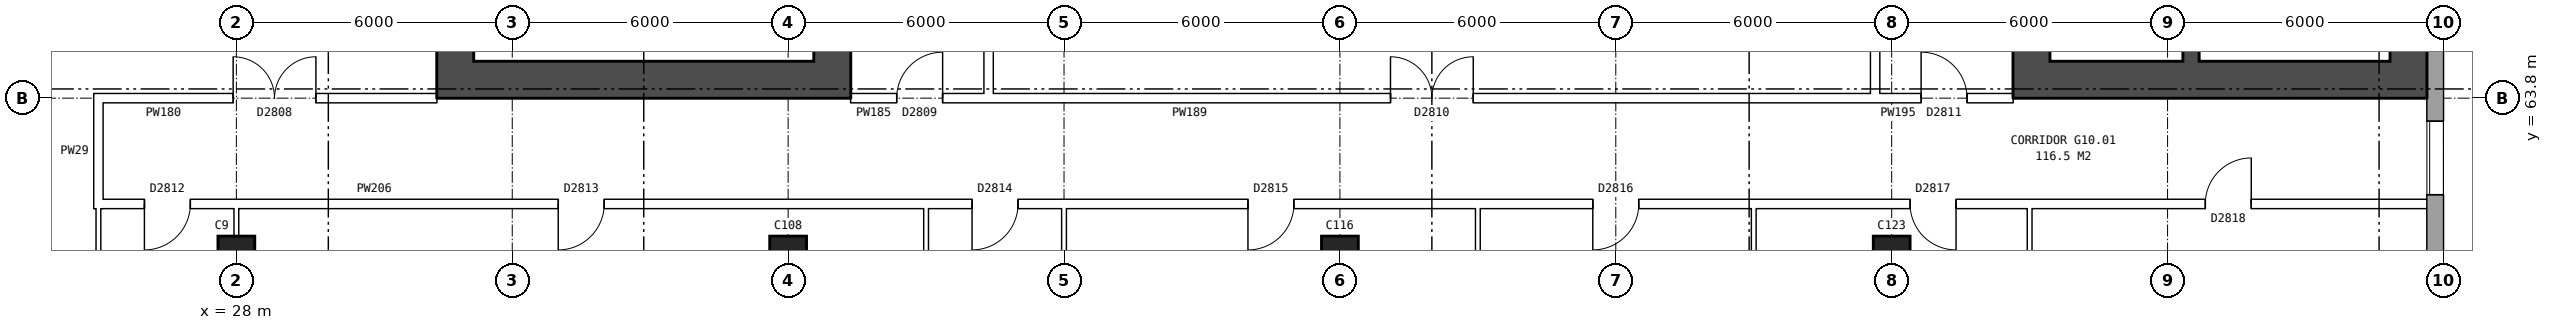
"""IFC4 building model, lengths in metres.
Left out: names, types, materials, properties, quantities, classifications, styles, units other than length and angle.
Written with IfcOpenShell. Run it as: python <this file> out.ifc"""

import sys

from ifc_helpers import new_model, si_unit, direction, frame, frame_2d, origin, origin_2d, place, context, subcontext, project, spatial, rectangle, extrude, element, fill, save


model = new_model("IFC4")
c1 = context("Model", 3, precision=1e-05, world=origin(), true_north=direction((0.0, 1.0)))
c2 = subcontext(c1, "Body", "Model", "MODEL_VIEW")
j1 = project(units=[si_unit("LENGTHUNIT", "METRE"), si_unit("PLANEANGLEUNIT", "RADIAN")], contexts=[c1])
p1 = place(None, origin())
s1 = spatial("IfcSite", under=j1, at=p1, CompositionType="ELEMENT")
p2 = place(p1, origin())
s2 = spatial("IfcBuilding", under=s1, at=p2, CompositionType="ELEMENT")
p3 = place(p2, frame((0.0, 0.0, 38.1)))
s3 = spatial("IfcBuildingStorey", under=s2, at=p3, CompositionType="ELEMENT", Elevation=38.1)
for number, where, z_axis, x_axis in (
    (1, (28.0, 60.4, 0.0), (0.0, 0.0, 1.0), (1.0, 0.0, 0.0)),
    (2, (40.0, 60.4, 0.0), (0.0, 0.0, 1.0), (1.0, 0.0, 0.0)),
    (3, (52.0, 60.4, 0.0), (0.0, 0.0, 1.0), (1.0, 0.0, 0.0)),
    (4, (64.0, 60.4, 0.0), (0.0, 0.0, 1.0), (1.0, 0.0, 0.0)),
):
    element("IfcColumn", number, at=place(p3, frame(where, z_axis=z_axis, x_axis=x_axis)), inside=s3, PredefinedType="COLUMN", context=c2, shape_type="SweptSolid", body=[
        extrude(rectangle(XDim=0.8, YDim=0.8, at=origin_2d()), origin(), (0.0, 0.0, 1.0), 5.6),
    ])
p4 = place(p3, frame((75.82, 57.075, 0.0), z_axis=(0.0, 0.0, 1.0), x_axis=(0.0, 1.0, 0.0)))
e5 = element("IfcWall", 5, at=p4, inside=s3, PredefinedType="STANDARD", context=c2, shape_type="SweptSolid", body=[
    extrude(rectangle(XDim=25.851, YDim=0.36, at=frame_2d((12.925, 0.0))), origin(), (0.0, 0.0, 1.0), 5.6),
])
p5 = place(p4, frame((1.625, 0.0, 0.15)))
e6 = element("IfcOpeningElement", 6, at=p5, cuts=e5, PredefinedType="OPENING", context=c2, shape_type="SweptSolid", body=[
    extrude(rectangle(XDim=1.6, YDim=2.4, at=frame_2d((0.8, 1.2))), frame((0.0, 0.19, 0.0), z_axis=(0.0, -1.0, 0.0), x_axis=(1.0, 0.0, 0.0)), (0.0, 0.0, 1.0), 0.38),
])
p6 = place(p4, frame((4.625, 0.0, 0.15)))
e7 = element("IfcOpeningElement", 7, at=p6, cuts=e5, PredefinedType="OPENING", context=c2, shape_type="SweptSolid", body=[
    extrude(rectangle(XDim=1.6, YDim=2.4, at=frame_2d((0.8, 1.2))), frame((0.0, 0.19, 0.0), z_axis=(0.0, -1.0, 0.0), x_axis=(1.0, 0.0, 0.0)), (0.0, 0.0, 1.0), 0.38),
])
p7 = place(p4, frame((19.625, 0.0, 0.15)))
e8 = element("IfcOpeningElement", 8, at=p7, cuts=e5, PredefinedType="OPENING", context=c2, shape_type="SweptSolid", body=[
    extrude(rectangle(XDim=1.6, YDim=2.4, at=frame_2d((0.8, 1.2))), frame((0.0, 0.19, 0.0), z_axis=(0.0, -1.0, 0.0), x_axis=(1.0, 0.0, 0.0)), (0.0, 0.0, 1.0), 0.38),
])
p8 = place(p4, frame((22.625, 0.0, 0.15)))
e9 = element("IfcOpeningElement", 9, at=p8, cuts=e5, PredefinedType="OPENING", context=c2, shape_type="SweptSolid", body=[
    extrude(rectangle(XDim=1.6, YDim=2.4, at=frame_2d((0.8, 1.2))), frame((0.0, 0.19, 0.0), z_axis=(0.0, -1.0, 0.0), x_axis=(1.0, 0.0, 0.0)), (0.0, 0.0, 1.0), 0.38),
])
p9 = place(p3, frame((67.04, 64.6, 0.0), z_axis=(0.0, 0.0, 1.0), x_axis=(0.0, 1.0, 0.0)))
e10 = element("IfcWall", 10, at=p9, inside=s3, PredefinedType="SHEAR", context=c2, shape_type="SweptSolid", body=[
    extrude(rectangle(XDim=10.8, YDim=0.8, at=frame_2d((5.4, 0.0))), origin(), (0.0, 0.0, 1.0), 5.6),
])
p10 = place(p9, frame((0.525, 0.0, 0.0)))
e11 = element("IfcOpeningElement", 11, at=p10, cuts=e10, PredefinedType="OPENING", context=c2, shape_type="SweptSolid", body=[
    extrude(rectangle(XDim=1.1, YDim=2.1, at=frame_2d((0.55, 1.05))), frame((0.0, 0.41, 0.0), z_axis=(0.0, -1.0, 0.0), x_axis=(1.0, 0.0, 0.0)), (0.0, 0.0, 1.0), 0.82),
])
p11 = place(p9, frame((9.1, 0.0, 0.0)))
e12 = element("IfcOpeningElement", 12, at=p11, cuts=e10, PredefinedType="OPENING", context=c2, shape_type="SweptSolid", body=[
    extrude(rectangle(XDim=1.1, YDim=2.1, at=frame_2d((0.55, 1.05))), frame((0.0, 0.41, 0.0), z_axis=(0.0, -1.0, 0.0), x_axis=(1.0, 0.0, 0.0)), (0.0, 0.0, 1.0), 0.82),
])
p12 = place(p3, frame((75.24, 64.6, 0.0), z_axis=(0.0, 0.0, 1.0), x_axis=(0.0, 1.0, 0.0)))
e13 = element("IfcWall", 13, at=p12, inside=s3, PredefinedType="SHEAR", context=c2, shape_type="SweptSolid", body=[
    extrude(rectangle(XDim=10.8, YDim=0.8, at=frame_2d((5.4, 0.0))), origin(), (0.0, 0.0, 1.0), 5.6),
])
p13 = place(p3, frame((66.64, 64.2, 0.0), z_axis=(0.0, 0.0, 1.0), x_axis=(1.0, 0.0, 0.0)))
e14 = element("IfcWall", 14, at=p13, inside=s3, PredefinedType="SHEAR", context=c2, shape_type="SweptSolid", body=[
    extrude(rectangle(XDim=9.0, YDim=0.8, at=frame_2d((4.5, 0.0))), origin(), (0.0, 0.0, 1.0), 5.6),
])
p14 = place(p3, frame((70.51, 64.6, 0.0), z_axis=(0.0, 0.0, 1.0), x_axis=(0.0, 1.0, 0.0)))
e15 = element("IfcWall", 15, at=p14, inside=s3, PredefinedType="SHEAR", context=c2, shape_type="SweptSolid", body=[
    extrude(rectangle(XDim=2.075, YDim=0.35, at=frame_2d((1.038, 0.0))), origin(), (0.0, 0.0, 1.0), 5.6),
])
p15 = place(p3, frame((63.64, 63.9, 0.0), z_axis=(0.0, 0.0, 1.0), x_axis=(0.0, 1.0, 0.0)))
e16 = element("IfcWall", 16, at=p15, inside=s3, PredefinedType="PARTITIONING", context=c2, shape_type="SweptSolid", body=[
    extrude(rectangle(XDim=12.2, YDim=0.2, at=frame_2d((6.1, 0.0))), origin(), (0.0, 0.0, 1.0), 5.6),
])
p16 = place(p15, frame((5.1, 0.0, 0.0)))
e17 = element("IfcOpeningElement", 17, at=p16, cuts=e16, PredefinedType="OPENING", context=c2, shape_type="SweptSolid", body=[
    extrude(rectangle(XDim=2.0, YDim=2.1, at=frame_2d((1.0, 1.05))), frame((0.0, 0.11, 0.0), z_axis=(0.0, -1.0, 0.0), x_axis=(1.0, 0.0, 0.0)), (0.0, 0.0, 1.0), 0.22),
])
p17 = place(p3, frame((40.96, 75.4, 0.0), z_axis=(0.0, 0.0, 1.0), x_axis=(0.0, -1.0, 0.0)))
e18 = element("IfcWall", 18, at=p17, inside=s3, PredefinedType="SHEAR", context=c2, shape_type="SweptSolid", body=[
    extrude(rectangle(XDim=10.8, YDim=0.8, at=frame_2d((5.4, 0.0))), origin(), (0.0, 0.0, 1.0), 5.6),
])
p18 = place(p17, frame((0.525, 0.0, 0.0)))
e19 = element("IfcOpeningElement", 19, at=p18, cuts=e18, PredefinedType="OPENING", context=c2, shape_type="SweptSolid", body=[
    extrude(rectangle(XDim=1.1, YDim=2.1, at=frame_2d((0.55, 1.05))), frame((0.0, 0.41, 0.0), z_axis=(0.0, -1.0, 0.0), x_axis=(1.0, 0.0, 0.0)), (0.0, 0.0, 1.0), 0.82),
])
p19 = place(p17, frame((2.8, 0.0, 0.0)))
e20 = element("IfcOpeningElement", 20, at=p19, cuts=e18, PredefinedType="OPENING", context=c2, shape_type="SweptSolid", body=[
    extrude(rectangle(XDim=1.1, YDim=2.1, at=frame_2d((0.55, 1.05))), frame((0.0, 0.41, 0.0), z_axis=(0.0, -1.0, 0.0), x_axis=(1.0, 0.0, 0.0)), (0.0, 0.0, 1.0), 0.82),
])
p20 = place(p17, frame((5.0, 0.0, 0.0)))
e21 = element("IfcOpeningElement", 21, at=p20, cuts=e18, PredefinedType="OPENING", context=c2, shape_type="SweptSolid", body=[
    extrude(rectangle(XDim=1.1, YDim=2.1, at=frame_2d((0.55, 1.05))), frame((0.0, 0.41, 0.0), z_axis=(0.0, -1.0, 0.0), x_axis=(1.0, 0.0, 0.0)), (0.0, 0.0, 1.0), 0.82),
])
p21 = place(p17, frame((7.2, 0.0, 0.0)))
e22 = element("IfcOpeningElement", 22, at=p21, cuts=e18, PredefinedType="OPENING", context=c2, shape_type="SweptSolid", body=[
    extrude(rectangle(XDim=1.1, YDim=2.1, at=frame_2d((0.55, 1.05))), frame((0.0, 0.41, 0.0), z_axis=(0.0, -1.0, 0.0), x_axis=(1.0, 0.0, 0.0)), (0.0, 0.0, 1.0), 0.82),
])
p22 = place(p17, frame((9.1, 0.0, 0.0)))
e23 = element("IfcOpeningElement", 23, at=p22, cuts=e18, PredefinedType="OPENING", context=c2, shape_type="SweptSolid", body=[
    extrude(rectangle(XDim=1.1, YDim=2.1, at=frame_2d((0.55, 1.05))), frame((0.0, 0.41, 0.0), z_axis=(0.0, -1.0, 0.0), x_axis=(1.0, 0.0, 0.0)), (0.0, 0.0, 1.0), 0.82),
])
p23 = place(p3, frame((32.76, 75.4, 0.0), z_axis=(0.0, 0.0, 1.0), x_axis=(0.0, -1.0, 0.0)))
e24 = element("IfcWall", 24, at=p23, inside=s3, PredefinedType="SHEAR", context=c2, shape_type="SweptSolid", body=[
    extrude(rectangle(XDim=10.8, YDim=0.8, at=frame_2d((5.4, 0.0))), origin(), (0.0, 0.0, 1.0), 5.6),
])
p24 = place(p3, frame((41.36, 64.2, 0.0), z_axis=(0.0, 0.0, 1.0), x_axis=(-1.0, 0.0, 0.0)))
e25 = element("IfcWall", 25, at=p24, inside=s3, PredefinedType="SHEAR", context=c2, shape_type="SweptSolid", body=[
    extrude(rectangle(XDim=9.0, YDim=0.8, at=frame_2d((4.5, 0.0))), origin(), (0.0, 0.0, 1.0), 5.6),
])
p25 = place(p3, frame((44.36, 63.9, 0.0), z_axis=(0.0, 0.0, 1.0), x_axis=(0.0, 1.0, 0.0)))
e26 = element("IfcWall", 26, at=p25, inside=s3, PredefinedType="PARTITIONING", context=c2, shape_type="SweptSolid", body=[
    extrude(rectangle(XDim=12.2, YDim=0.2, at=frame_2d((6.1, 0.0))), origin(), (0.0, 0.0, 1.0), 5.6),
])
p26 = place(p25, frame((5.1, 0.0, 0.0)))
e27 = element("IfcOpeningElement", 27, at=p26, cuts=e26, PredefinedType="OPENING", context=c2, shape_type="SweptSolid", body=[
    extrude(rectangle(XDim=2.0, YDim=2.1, at=frame_2d((1.0, 1.05))), frame((0.0, 0.11, 0.0), z_axis=(0.0, -1.0, 0.0), x_axis=(1.0, 0.0, 0.0)), (0.0, 0.0, 1.0), 0.22),
])
p27 = place(p3, frame((24.9, 61.5, 0.0), z_axis=(0.0, 0.0, 1.0), x_axis=(1.0, 0.0, 0.0)))
e28 = element("IfcWall", 28, at=p27, inside=s3, PredefinedType="PARTITIONING", context=c2, shape_type="SweptSolid", body=[
    extrude(rectangle(XDim=50.86, YDim=0.2, at=frame_2d((25.43, 0.0))), origin(), (0.0, 0.0, 1.0), 5.6),
])
p28 = place(p27, frame((1.1, 0.0, 0.0)))
e29 = element("IfcOpeningElement", 29, at=p28, cuts=e28, PredefinedType="OPENING", context=c2, shape_type="SweptSolid", body=[
    extrude(rectangle(XDim=1.0, YDim=2.1, at=frame_2d((0.5, 1.05))), frame((0.0, 0.11, 0.0), z_axis=(0.0, -1.0, 0.0), x_axis=(1.0, 0.0, 0.0)), (0.0, 0.0, 1.0), 0.22),
])
p29 = place(p27, frame((10.1, 0.0, 0.0)))
e30 = element("IfcOpeningElement", 30, at=p29, cuts=e28, PredefinedType="OPENING", context=c2, shape_type="SweptSolid", body=[
    extrude(rectangle(XDim=1.0, YDim=2.1, at=frame_2d((0.5, 1.05))), frame((0.0, 0.11, 0.0), z_axis=(0.0, -1.0, 0.0), x_axis=(1.0, 0.0, 0.0)), (0.0, 0.0, 1.0), 0.22),
])
p30 = place(p27, frame((19.1, 0.0, 0.0)))
e31 = element("IfcOpeningElement", 31, at=p30, cuts=e28, PredefinedType="OPENING", context=c2, shape_type="SweptSolid", body=[
    extrude(rectangle(XDim=1.0, YDim=2.1, at=frame_2d((0.5, 1.05))), frame((0.0, 0.11, 0.0), z_axis=(0.0, -1.0, 0.0), x_axis=(1.0, 0.0, 0.0)), (0.0, 0.0, 1.0), 0.22),
])
p31 = place(p27, frame((25.1, 0.0, 0.0)))
e32 = element("IfcOpeningElement", 32, at=p31, cuts=e28, PredefinedType="OPENING", context=c2, shape_type="SweptSolid", body=[
    extrude(rectangle(XDim=1.0, YDim=2.1, at=frame_2d((0.5, 1.05))), frame((0.0, 0.11, 0.0), z_axis=(0.0, -1.0, 0.0), x_axis=(1.0, 0.0, 0.0)), (0.0, 0.0, 1.0), 0.22),
])
p32 = place(p27, frame((32.6, 0.0, 0.0)))
e33 = element("IfcOpeningElement", 33, at=p32, cuts=e28, PredefinedType="OPENING", context=c2, shape_type="SweptSolid", body=[
    extrude(rectangle(XDim=1.0, YDim=2.1, at=frame_2d((0.5, 1.05))), frame((0.0, 0.11, 0.0), z_axis=(0.0, -1.0, 0.0), x_axis=(1.0, 0.0, 0.0)), (0.0, 0.0, 1.0), 0.22),
])
p33 = place(p27, frame((39.5, 0.0, 0.0)))
e34 = element("IfcOpeningElement", 34, at=p33, cuts=e28, PredefinedType="OPENING", context=c2, shape_type="SweptSolid", body=[
    extrude(rectangle(XDim=1.0, YDim=2.1, at=frame_2d((0.5, 1.05))), frame((0.0, 0.11, 0.0), z_axis=(0.0, -1.0, 0.0), x_axis=(1.0, 0.0, 0.0)), (0.0, 0.0, 1.0), 0.22),
])
p34 = place(p27, frame((45.92, 0.0, 0.0)))
e35 = element("IfcOpeningElement", 35, at=p34, cuts=e28, PredefinedType="OPENING", context=c2, shape_type="SweptSolid", body=[
    extrude(rectangle(XDim=1.0, YDim=2.1, at=frame_2d((0.5, 1.05))), frame((0.0, 0.11, 0.0), z_axis=(0.0, -1.0, 0.0), x_axis=(1.0, 0.0, 0.0)), (0.0, 0.0, 1.0), 0.22),
])
p35 = place(p3, frame((24.9, 63.8, 0.0), z_axis=(0.0, 0.0, 1.0), x_axis=(1.0, 0.0, 0.0)))
e36 = element("IfcWall", 36, at=p35, inside=s3, PredefinedType="PARTITIONING", context=c2, shape_type="SweptSolid", body=[
    extrude(rectangle(XDim=7.46, YDim=0.2, at=frame_2d((3.73, 0.0))), origin(), (0.0, 0.0, 1.0), 5.6),
])
p36 = place(p35, frame((3.03, 0.0, 0.0)))
e37 = element("IfcOpeningElement", 37, at=p36, cuts=e36, PredefinedType="OPENING", context=c2, shape_type="SweptSolid", body=[
    extrude(rectangle(XDim=1.8, YDim=2.1, at=frame_2d((0.9, 1.05))), frame((0.0, 0.11, 0.0), z_axis=(0.0, -1.0, 0.0), x_axis=(1.0, 0.0, 0.0)), (0.0, 0.0, 1.0), 0.22),
])
p37 = place(p3, frame((44.36, 63.8, 0.0), z_axis=(0.0, 0.0, 1.0), x_axis=(1.0, 0.0, 0.0)))
e38 = element("IfcWall", 38, at=p37, inside=s3, PredefinedType="PARTITIONING", context=c2, shape_type="SweptSolid", body=[
    extrude(rectangle(XDim=19.28, YDim=0.2, at=frame_2d((9.64, 0.0))), origin(), (0.0, 0.0, 1.0), 5.6),
])
p38 = place(p37, frame((8.74, 0.0, 0.0)))
e39 = element("IfcOpeningElement", 39, at=p38, cuts=e38, PredefinedType="OPENING", context=c2, shape_type="SweptSolid", body=[
    extrude(rectangle(XDim=1.8, YDim=2.1, at=frame_2d((0.9, 1.05))), frame((0.0, 0.11, 0.0), z_axis=(0.0, -1.0, 0.0), x_axis=(1.0, 0.0, 0.0)), (0.0, 0.0, 1.0), 0.22),
])
p39 = place(p3, frame((41.36, 63.8, 0.0), z_axis=(0.0, 0.0, 1.0), x_axis=(1.0, 0.0, 0.0)))
e40 = element("IfcWall", 40, at=p39, inside=s3, PredefinedType="PARTITIONING", context=c2, shape_type="SweptSolid", body=[
    extrude(rectangle(XDim=3.0, YDim=0.2, at=frame_2d((1.5, 0.0))), origin(), (0.0, 0.0, 1.0), 5.6),
])
p40 = place(p39, frame((1.0, 0.0, 0.0)))
e41 = element("IfcOpeningElement", 41, at=p40, cuts=e40, PredefinedType="OPENING", context=c2, shape_type="SweptSolid", body=[
    extrude(rectangle(XDim=1.0, YDim=2.1, at=frame_2d((0.5, 1.05))), frame((0.0, 0.11, 0.0), z_axis=(0.0, -1.0, 0.0), x_axis=(1.0, 0.0, 0.0)), (0.0, 0.0, 1.0), 0.22),
])
p41 = place(p3, frame((63.64, 63.8, 0.0), z_axis=(0.0, 0.0, 1.0), x_axis=(1.0, 0.0, 0.0)))
e42 = element("IfcWall", 42, at=p41, inside=s3, PredefinedType="PARTITIONING", context=c2, shape_type="SweptSolid", body=[
    extrude(rectangle(XDim=3.0, YDim=0.2, at=frame_2d((1.5, 0.0))), origin(), (0.0, 0.0, 1.0), 5.6),
])
p42 = place(p41, frame((1.0, 0.0, 0.0)))
e43 = element("IfcOpeningElement", 43, at=p42, cuts=e42, PredefinedType="OPENING", context=c2, shape_type="SweptSolid", body=[
    extrude(rectangle(XDim=1.0, YDim=2.1, at=frame_2d((0.5, 1.05))), frame((0.0, 0.11, 0.0), z_axis=(0.0, -1.0, 0.0), x_axis=(1.0, 0.0, 0.0)), (0.0, 0.0, 1.0), 0.22),
])
p43 = place(p3, frame((25.0, 61.398, 0.0), z_axis=(0.0, 0.0, 1.0), x_axis=(0.0, 1.0, 0.0)))
e44 = element("IfcWall", 44, at=p43, inside=s3, PredefinedType="PARTITIONING", context=c2, shape_type="SweptSolid", body=[
    extrude(rectangle(XDim=2.502, YDim=0.2, at=frame_2d((1.251, 0.0))), origin(), (0.0, 0.0, 1.0), 5.6),
])
for number, where, z_axis, x_axis in (
    (45, (25.0, 54.24, 0.0), (0.0, 0.0, 1.0), (0.0, 1.0, 0.0)),
    (46, (28.0, 54.24, 0.0), (0.0, 0.0, 1.0), (0.0, 1.0, 0.0)),
    (47, (43.0, 54.24, 0.0), (0.0, 0.0, 1.0), (0.0, 1.0, 0.0)),
    (48, (46.0, 54.24, 0.0), (0.0, 0.0, 1.0), (0.0, 1.0, 0.0)),
    (49, (55.0, 54.24, 0.0), (0.0, 0.0, 1.0), (0.0, 1.0, 0.0)),
    (50, (61.0, 54.24, 0.0), (0.0, 0.0, 1.0), (0.0, 1.0, 0.0)),
    (51, (67.0, 54.24, 0.0), (0.0, 0.0, 1.0), (0.0, 1.0, 0.0)),
):
    element("IfcWall", number, at=place(p3, frame(where, z_axis=z_axis, x_axis=x_axis)), inside=s3, PredefinedType="PARTITIONING", context=c2, shape_type="SweptSolid", body=[
        extrude(rectangle(XDim=7.36, YDim=0.1, at=frame_2d((3.68, 0.0))), origin(), (0.0, 0.0, 1.0), 5.6),
    ])
p44 = place(p6, origin())
e52 = element("IfcWindow", 52, at=p44, inside=s3, PartitioningType="SINGLE_PANEL", PredefinedType="WINDOW", context=c2, shape_type="SweptSolid", body=[
    extrude(rectangle(XDim=1.6, YDim=2.4, at=frame_2d((0.8, 1.2))), frame((0.0, 0.15, 0.0), z_axis=(0.0, -1.0, 0.0), x_axis=(1.0, 0.0, 0.0)), (0.0, 0.0, 1.0), 0.06),
])
fill(e7, e52)
p45 = place(p28, frame((1.0, 0.0, 0.0), z_axis=(0.0, 0.0, 1.0), x_axis=(-1.0, 0.0, 0.0)))
e53 = element("IfcDoor", 53, at=p45, inside=s3, OperationType="SINGLE_SWING_RIGHT", PredefinedType="DOOR", context=c2, shape_type="SweptSolid", body=[
    extrude(rectangle(XDim=1.0, YDim=2.1, at=frame_2d((0.5, 1.05))), frame((0.0, 0.025, 0.0), z_axis=(0.0, -1.0, 0.0), x_axis=(1.0, 0.0, 0.0)), (0.0, 0.0, 1.0), 0.05),
])
fill(e29, e53)
p46 = place(p29, frame((1.0, 0.0, 0.0), z_axis=(0.0, 0.0, 1.0), x_axis=(-1.0, 0.0, 0.0)))
e54 = element("IfcDoor", 54, at=p46, inside=s3, OperationType="SINGLE_SWING_RIGHT", PredefinedType="DOOR", context=c2, shape_type="SweptSolid", body=[
    extrude(rectangle(XDim=1.0, YDim=2.1, at=frame_2d((0.5, 1.05))), frame((0.0, 0.025, 0.0), z_axis=(0.0, -1.0, 0.0), x_axis=(1.0, 0.0, 0.0)), (0.0, 0.0, 1.0), 0.05),
])
fill(e30, e54)
p47 = place(p30, frame((1.0, 0.0, 0.0), z_axis=(0.0, 0.0, 1.0), x_axis=(-1.0, 0.0, 0.0)))
e55 = element("IfcDoor", 55, at=p47, inside=s3, OperationType="SINGLE_SWING_RIGHT", PredefinedType="DOOR", context=c2, shape_type="SweptSolid", body=[
    extrude(rectangle(XDim=1.0, YDim=2.1, at=frame_2d((0.5, 1.05))), frame((0.0, 0.025, 0.0), z_axis=(0.0, -1.0, 0.0), x_axis=(1.0, 0.0, 0.0)), (0.0, 0.0, 1.0), 0.05),
])
fill(e31, e55)
p48 = place(p31, frame((1.0, 0.0, 0.0), z_axis=(0.0, 0.0, 1.0), x_axis=(-1.0, 0.0, 0.0)))
e56 = element("IfcDoor", 56, at=p48, inside=s3, OperationType="SINGLE_SWING_RIGHT", PredefinedType="DOOR", context=c2, shape_type="SweptSolid", body=[
    extrude(rectangle(XDim=1.0, YDim=2.1, at=frame_2d((0.5, 1.05))), frame((0.0, 0.025, 0.0), z_axis=(0.0, -1.0, 0.0), x_axis=(1.0, 0.0, 0.0)), (0.0, 0.0, 1.0), 0.05),
])
fill(e32, e56)
p49 = place(p32, frame((1.0, 0.0, 0.0), z_axis=(0.0, 0.0, 1.0), x_axis=(-1.0, 0.0, 0.0)))
e57 = element("IfcDoor", 57, at=p49, inside=s3, OperationType="SINGLE_SWING_RIGHT", PredefinedType="DOOR", context=c2, shape_type="SweptSolid", body=[
    extrude(rectangle(XDim=1.0, YDim=2.1, at=frame_2d((0.5, 1.05))), frame((0.0, 0.025, 0.0), z_axis=(0.0, -1.0, 0.0), x_axis=(1.0, 0.0, 0.0)), (0.0, 0.0, 1.0), 0.05),
])
fill(e33, e57)
p50 = place(p33, frame((1.0, 0.0, 0.0), z_axis=(0.0, 0.0, 1.0), x_axis=(-1.0, 0.0, 0.0)))
e58 = element("IfcDoor", 58, at=p50, inside=s3, OperationType="SINGLE_SWING_LEFT", PredefinedType="DOOR", context=c2, shape_type="SweptSolid", body=[
    extrude(rectangle(XDim=1.0, YDim=2.1, at=frame_2d((0.5, 1.05))), frame((0.0, 0.025, 0.0), z_axis=(0.0, -1.0, 0.0), x_axis=(1.0, 0.0, 0.0)), (0.0, 0.0, 1.0), 0.05),
])
fill(e34, e58)
p51 = place(p34, origin())
e59 = element("IfcDoor", 59, at=p51, inside=s3, OperationType="SINGLE_SWING_RIGHT", PredefinedType="DOOR", context=c2, shape_type="SweptSolid", body=[
    extrude(rectangle(XDim=1.0, YDim=2.1, at=frame_2d((0.5, 1.05))), frame((0.0, 0.025, 0.0), z_axis=(0.0, -1.0, 0.0), x_axis=(1.0, 0.0, 0.0)), (0.0, 0.0, 1.0), 0.05),
])
fill(e35, e59)
p52 = place(p36, origin())
e60 = element("IfcDoor", 60, at=p52, inside=s3, OperationType="DOUBLE_DOOR_SINGLE_SWING", PredefinedType="DOOR", context=c2, shape_type="SweptSolid", body=[
    extrude(rectangle(XDim=1.8, YDim=2.1, at=frame_2d((0.9, 1.05))), frame((0.0, 0.025, 0.0), z_axis=(0.0, -1.0, 0.0), x_axis=(1.0, 0.0, 0.0)), (0.0, 0.0, 1.0), 0.05),
])
fill(e37, e60)
p53 = place(p38, origin())
e61 = element("IfcDoor", 61, at=p53, inside=s3, OperationType="DOUBLE_DOOR_SINGLE_SWING", PredefinedType="DOOR", context=c2, shape_type="SweptSolid", body=[
    extrude(rectangle(XDim=1.8, YDim=2.1, at=frame_2d((0.9, 1.05))), frame((0.0, 0.025, 0.0), z_axis=(0.0, -1.0, 0.0), x_axis=(1.0, 0.0, 0.0)), (0.0, 0.0, 1.0), 0.05),
])
fill(e39, e61)
p54 = place(p40, origin())
e62 = element("IfcDoor", 62, at=p54, inside=s3, OperationType="SINGLE_SWING_RIGHT", PredefinedType="DOOR", context=c2, shape_type="SweptSolid", body=[
    extrude(rectangle(XDim=1.0, YDim=2.1, at=frame_2d((0.5, 1.05))), frame((0.0, 0.025, 0.0), z_axis=(0.0, -1.0, 0.0), x_axis=(1.0, 0.0, 0.0)), (0.0, 0.0, 1.0), 0.05),
])
fill(e41, e62)
p55 = place(p42, origin())
e63 = element("IfcDoor", 63, at=p55, inside=s3, OperationType="SINGLE_SWING_LEFT", PredefinedType="DOOR", context=c2, shape_type="SweptSolid", body=[
    extrude(rectangle(XDim=1.0, YDim=2.1, at=frame_2d((0.5, 1.05))), frame((0.0, 0.025, 0.0), z_axis=(0.0, -1.0, 0.0), x_axis=(1.0, 0.0, 0.0)), (0.0, 0.0, 1.0), 0.05),
])
fill(e43, e63)
save(model, sys.argv[1])
